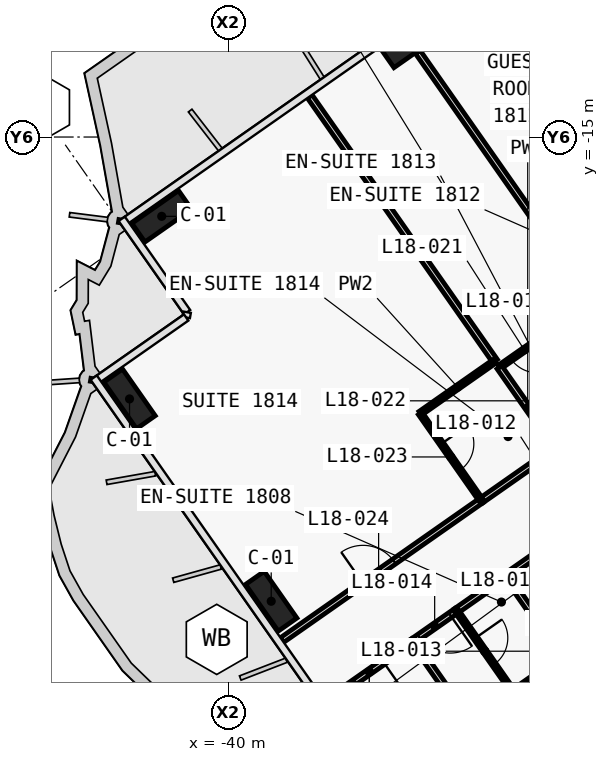
"""IFC4 building model, lengths in metres.
Left out: names, types, materials, properties, quantities, classifications, styles, units other than length and angle.
Written with IfcOpenShell. Run it as: python <this file> out.ifc"""

import sys

from ifc_helpers import new_model, si_unit, direction, frame, frame_2d, origin, origin_2d, place, context, subcontext, project, spatial, rectangle, extrude, element, fill, save


model = new_model("IFC4")
c1 = context("Model", 3, precision=1e-05, world=origin(), true_north=direction((0.0, 1.0)))
c2 = subcontext(c1, "Body", "Model", "MODEL_VIEW")
j1 = project(units=[si_unit("LENGTHUNIT", "METRE"), si_unit("PLANEANGLEUNIT", "RADIAN")], contexts=[c1])
p1 = place(None, origin())
s1 = spatial("IfcSite", under=j1, at=p1, CompositionType="ELEMENT")
p2 = place(p1, origin())
s2 = spatial("IfcBuilding", under=s1, at=p2, CompositionType="ELEMENT")
p3 = place(p2, frame((0.0, 0.0, 90.5)))
s3 = spatial("IfcBuildingStorey", under=s2, at=p3, CompositionType="ELEMENT", Elevation=90.5)
for number, where, z_axis, x_axis in (
    (1, (-35.197, -12.498, 0.0), (0.0, 0.0, 1.0), (-0.819, -0.574, 0.0)),
    (2, (-41.75, -17.087, 0.0), (0.0, 0.0, 1.0), (-0.819, -0.574, 0.0)),
    (3, (-38.869, -27.216, 0.0), (0.0, 0.0, 1.0), (-0.574, 0.819, 0.0)),
    (4, (-42.597, -21.892, 0.0), (0.0, 0.0, 1.0), (-0.574, 0.819, 0.0)),
):
    element("IfcColumn", number, at=place(p3, frame(where, z_axis=z_axis, x_axis=x_axis)), inside=s3, PredefinedType="COLUMN", context=c2, shape_type="SweptSolid", body=[
        extrude(rectangle(XDim=1.5, YDim=0.6, at=origin_2d()), origin(), (0.0, 0.0, 1.0), 3.6),
    ])
p4 = place(p3, frame((-38.582, -28.236, 0.0), z_axis=(0.0, 0.0, 1.0), x_axis=(0.819158447199, 0.573567291939, 0.0)))
e5 = element("IfcWall", 5, at=p4, inside=s3, PredefinedType="PARTITIONING", context=c2, shape_type="SweptSolid", body=[
    extrude(rectangle(XDim=6.401, YDim=0.15, at=frame_2d((3.2, 0.0))), origin(), (0.0, 0.0, 1.0), 2.5),
])
p5 = place(p4, frame((2.6, 0.0, 0.0)))
e6 = element("IfcOpeningElement", 6, at=p5, cuts=e5, PredefinedType="OPENING", context=c2, shape_type="SweptSolid", body=[
    extrude(rectangle(XDim=1.0, YDim=2.1, at=frame_2d((0.5, 1.05))), frame((0.0, 0.085, 0.0), z_axis=(0.0, -1.0, 0.0), x_axis=(1.0, 0.0, 0.0)), (0.0, 0.0, 1.0), 0.17),
])
p6 = place(p3, frame((-33.341, -24.566, 0.0), z_axis=(0.0, 0.0, 1.0), x_axis=(0.819179439794, 0.573537309527, 0.0)))
e7 = element("IfcWall", 7, at=p6, inside=s3, PredefinedType="PARTITIONING", context=c2, shape_type="SweptSolid", body=[
    extrude(rectangle(XDim=2.404, YDim=0.15, at=frame_2d((1.202, 0.0))), origin(), (0.0, 0.0, 1.0), 3.32),
])
p7 = place(p3, frame((-31.371, -25.629, 0.0), z_axis=(0.0, 0.0, 1.0), x_axis=(-0.819189013667, -0.573523634986, 0.0)))
e8 = element("IfcWall", 8, at=p7, inside=s3, PredefinedType="PARTITIONING", context=c2, shape_type="SweptSolid", body=[
    extrude(rectangle(XDim=1.604, YDim=0.15, at=frame_2d((0.802, 0.0))), origin(), (0.0, 0.0, 1.0), 3.32),
])
p8 = place(p3, frame((-33.993, -27.465, 0.0), z_axis=(0.0, 0.0, 1.0), x_axis=(-0.819199220913, -0.573509055252, 0.0)))
e9 = element("IfcWall", 9, at=p8, inside=s3, PredefinedType="PARTITIONING", context=c2, shape_type="SweptSolid", body=[
    extrude(rectangle(XDim=1.403, YDim=0.15, at=frame_2d((0.702, 0.0))), origin(), (0.0, 0.0, 1.0), 3.32),
])
p9 = place(p8, frame((0.201, 0.0, 0.0)))
e10 = element("IfcOpeningElement", 10, at=p9, cuts=e9, PredefinedType="OPENING", context=c2, shape_type="SweptSolid", body=[
    extrude(rectangle(XDim=1.0, YDim=2.1, at=frame_2d((0.5, 1.05))), frame((0.0, 0.085, 0.0), z_axis=(0.0, -1.0, 0.0), x_axis=(1.0, 0.0, 0.0)), (0.0, 0.0, 1.0), 0.17),
])
p10 = place(p3, frame((-32.682, -26.546, 0.0), z_axis=(0.0, 0.0, 1.0), x_axis=(-0.819117502046, -0.573625764625, 0.0)))
e11 = element("IfcWall", 11, at=p10, inside=s3, PredefinedType="PARTITIONING", context=c2, shape_type="SweptSolid", body=[
    extrude(rectangle(XDim=1.604, YDim=0.15, at=frame_2d((0.802, 0.0))), origin(), (0.0, 0.0, 1.0), 3.32),
])
p11 = place(p3, frame((-35.139, -28.267, 0.0), z_axis=(0.0, 0.0, 1.0), x_axis=(-0.819125488359, -0.573614360281, 0.0)))
e12 = element("IfcWall", 12, at=p11, inside=s3, PredefinedType="PARTITIONING", context=c2, shape_type="SweptSolid", body=[
    extrude(rectangle(XDim=2.802, YDim=0.15, at=frame_2d((1.401, 0.0))), origin(), (0.0, 0.0, 1.0), 2.5),
])
p12 = place(p11, frame((0.951, 0.0, 0.0)))
e13 = element("IfcOpeningElement", 13, at=p12, cuts=e12, PredefinedType="OPENING", context=c2, shape_type="SweptSolid", body=[
    extrude(rectangle(XDim=0.9, YDim=2.1, at=frame_2d((0.45, 1.05))), frame((0.0, 0.085, 0.0), z_axis=(0.0, -1.0, 0.0), x_axis=(1.0, 0.0, 0.0)), (0.0, 0.0, 1.0), 0.17),
])
p13 = place(p3, frame((-27.949, -17.618, 0.0), z_axis=(0.0, 0.0, 1.0), x_axis=(-0.573579093502, 0.819150183725, 0.0)))
e14 = element("IfcWall", 14, at=p13, inside=s3, PredefinedType="PARTITIONING", context=c2, shape_type="SweptSolid", body=[
    extrude(rectangle(XDim=8.701, YDim=0.15, at=frame_2d((4.351, 0.0))), origin(), (0.0, 0.0, 1.0), 2.6),
])
p14 = place(p3, frame((-29.845, -20.141, 0.0), z_axis=(0.0, 0.0, 1.0), x_axis=(-0.573558725113, 0.819164445546, 0.0)))
e15 = element("IfcWall", 15, at=p14, inside=s3, PredefinedType="PARTITIONING", context=c2, shape_type="SweptSolid", body=[
    extrude(rectangle(XDim=9.01, YDim=0.15, at=frame_2d((4.505, 0.0))), origin(), (0.0, 0.0, 1.0), 2.6),
])
p15 = place(p3, frame((-31.555, -20.14, 0.0), z_axis=(0.0, 0.0, 1.0), x_axis=(-0.819131543282, -0.57360571371, 0.0)))
e16 = element("IfcWall", 16, at=p15, inside=s3, PredefinedType="PARTITIONING", context=c2, shape_type="SweptSolid", body=[
    extrude(rectangle(XDim=1.6, YDim=0.12, at=frame_2d((0.8, 0.0))), origin(), (0.0, 0.0, 1.0), 3.32),
])
p16 = place(p15, frame((0.375, 0.0, 0.0)))
e17 = element("IfcOpeningElement", 17, at=p16, cuts=e16, PredefinedType="OPENING", context=c2, shape_type="SweptSolid", body=[
    extrude(rectangle(XDim=0.85, YDim=2.05, at=frame_2d((0.425, 1.025))), frame((0.0, 0.07, 0.0), z_axis=(0.0, -1.0, 0.0), x_axis=(1.0, 0.0, 0.0)), (0.0, 0.0, 1.0), 0.14),
])
p17 = place(p3, frame((-32.979, -20.896, 0.0), z_axis=(0.0, 0.0, 1.0), x_axis=(-0.573576058406, 0.819152308929, 0.0)))
e18 = element("IfcWall", 18, at=p17, inside=s3, PredefinedType="PARTITIONING", context=c2, shape_type="SweptSolid", body=[
    extrude(rectangle(XDim=8.501, YDim=0.15, at=frame_2d((4.25, 0.0))), origin(), (0.0, 0.0, 1.0), 2.5),
])
p18 = place(p3, frame((-31.373, -23.189, 0.0), z_axis=(0.0, 0.0, 1.0), x_axis=(-0.573600972199, 0.819134863556, 0.0)))
e19 = element("IfcWall", 19, at=p18, inside=s3, PredefinedType="PARTITIONING", context=c2, shape_type="SweptSolid", body=[
    extrude(rectangle(XDim=2.6, YDim=0.15, at=frame_2d((1.3, 0.0))), origin(), (0.0, 0.0, 1.0), 2.6),
])
p19 = place(p3, frame((-32.98, -20.894, 0.0), z_axis=(0.0, 0.0, 1.0), x_axis=(-0.819155442668, -0.573571582932, 0.0)))
e20 = element("IfcWall", 20, at=p19, inside=s3, PredefinedType="PARTITIONING", context=c2, shape_type="SweptSolid", body=[
    extrude(rectangle(XDim=2.4, YDim=0.12, at=frame_2d((1.2, 0.0))), origin(), (0.0, 0.0, 1.0), 3.32),
])
p20 = place(p3, frame((-34.946, -22.272, 0.0), z_axis=(0.0, 0.0, 1.0), x_axis=(0.573608623498, -0.819129505664, 0.0)))
e21 = element("IfcWall", 21, at=p20, inside=s3, PredefinedType="PARTITIONING", context=c2, shape_type="SweptSolid", body=[
    extrude(rectangle(XDim=2.8, YDim=0.12, at=frame_2d((1.4, 0.0))), origin(), (0.0, 0.0, 1.0), 2.6),
])
p21 = place(p20, frame((0.975, 0.0, 0.0)))
e22 = element("IfcOpeningElement", 22, at=p21, cuts=e21, PredefinedType="OPENING", context=c2, shape_type="SweptSolid", body=[
    extrude(rectangle(XDim=0.85, YDim=2.05, at=frame_2d((0.425, 1.025))), frame((0.0, 0.07, 0.0), z_axis=(0.0, -1.0, 0.0), x_axis=(1.0, 0.0, 0.0)), (0.0, 0.0, 1.0), 0.14),
])
p22 = place(p3, frame((-31.192, -28.677, 0.0), z_axis=(0.0, 0.0, 1.0), x_axis=(-0.573537965655, 0.819178980414, 0.0)))
e23 = element("IfcWall", 23, at=p22, inside=s3, PredefinedType="PARTITIONING", context=c2, shape_type="SweptSolid", body=[
    extrude(rectangle(XDim=2.6, YDim=0.15, at=frame_2d((1.3, 0.0))), origin(), (0.0, 0.0, 1.0), 3.32),
])
p23 = place(p3, frame((-33.995, -27.466, 0.0), z_axis=(0.0, 0.0, 1.0), x_axis=(0.573582085028, -0.819148089014, 0.0)))
e24 = element("IfcWall", 24, at=p23, inside=s3, PredefinedType="PARTITIONING", context=c2, shape_type="SweptSolid", body=[
    extrude(rectangle(XDim=2.6, YDim=0.12, at=frame_2d((1.3, 0.0))), origin(), (0.0, 0.0, 1.0), 3.32),
])
p24 = place(p23, frame((0.875, 0.0, 0.0)))
e25 = element("IfcOpeningElement", 25, at=p24, cuts=e24, PredefinedType="OPENING", context=c2, shape_type="SweptSolid", body=[
    extrude(rectangle(XDim=0.85, YDim=2.05, at=frame_2d((0.425, 1.025))), frame((0.0, 0.07, 0.0), z_axis=(0.0, -1.0, 0.0), x_axis=(1.0, 0.0, 0.0)), (0.0, 0.0, 1.0), 0.14),
])
p25 = place(p3, frame((-32.502, -29.596, 0.0), z_axis=(0.0, 0.0, 1.0), x_axis=(0.819131543282, 0.57360571371, 0.0)))
e26 = element("IfcWall", 26, at=p25, inside=s3, PredefinedType="PARTITIONING", context=c2, shape_type="SweptSolid", body=[
    extrude(rectangle(XDim=1.6, YDim=0.12, at=frame_2d((0.8, 0.0))), origin(), (0.0, 0.0, 1.0), 3.32),
])
p26 = place(p3, frame((-32.675, -31.791, 0.0), z_axis=(0.0, 0.0, 1.0), x_axis=(-0.573553792486, 0.819167899227, 0.0)))
e27 = element("IfcWall", 27, at=p26, inside=s3, PredefinedType="PARTITIONING", context=c2, shape_type="SweptSolid", body=[
    extrude(rectangle(XDim=4.3, YDim=0.15, at=frame_2d((2.15, 0.0))), origin(), (0.0, 0.0, 1.0), 3.32),
])
p27 = place(p24, origin())
e28 = element("IfcDoor", 28, at=p27, inside=s3, OperationType="SINGLE_SWING_RIGHT", PredefinedType="DOOR", context=c2, shape_type="SweptSolid", body=[
    extrude(rectangle(XDim=0.85, YDim=2.05, at=frame_2d((0.425, 1.025))), frame((0.0, 0.025, 0.0), z_axis=(0.0, -1.0, 0.0), x_axis=(1.0, 0.0, 0.0)), (0.0, 0.0, 1.0), 0.05),
])
fill(e25, e28)
p28 = place(p9, origin())
e29 = element("IfcDoor", 29, at=p28, inside=s3, OperationType="SINGLE_SWING_LEFT", PredefinedType="DOOR", context=c2, shape_type="SweptSolid", body=[
    extrude(rectangle(XDim=1.0, YDim=2.1, at=frame_2d((0.5, 1.05))), frame((0.0, 0.025, 0.0), z_axis=(0.0, -1.0, 0.0), x_axis=(1.0, 0.0, 0.0)), (0.0, 0.0, 1.0), 0.05),
])
fill(e10, e29)
p29 = place(p12, origin())
e30 = element("IfcDoor", 30, at=p29, inside=s3, OperationType="SINGLE_SWING_LEFT", PredefinedType="DOOR", context=c2, shape_type="SweptSolid", body=[
    extrude(rectangle(XDim=0.9, YDim=2.1, at=frame_2d((0.45, 1.05))), frame((0.0, 0.025, 0.0), z_axis=(0.0, -1.0, 0.0), x_axis=(1.0, 0.0, 0.0)), (0.0, 0.0, 1.0), 0.05),
])
fill(e13, e30)
p30 = place(p16, origin())
e31 = element("IfcDoor", 31, at=p30, inside=s3, OperationType="SINGLE_SWING_LEFT", PredefinedType="DOOR", context=c2, shape_type="SweptSolid", body=[
    extrude(rectangle(XDim=0.85, YDim=2.05, at=frame_2d((0.425, 1.025))), frame((0.0, 0.025, 0.0), z_axis=(0.0, -1.0, 0.0), x_axis=(1.0, 0.0, 0.0)), (0.0, 0.0, 1.0), 0.05),
])
fill(e17, e31)
p31 = place(p21, origin())
e32 = element("IfcDoor", 32, at=p31, inside=s3, OperationType="SINGLE_SWING_LEFT", PredefinedType="DOOR", context=c2, shape_type="SweptSolid", body=[
    extrude(rectangle(XDim=0.85, YDim=2.05, at=frame_2d((0.425, 1.025))), frame((0.0, 0.025, 0.0), z_axis=(0.0, -1.0, 0.0), x_axis=(1.0, 0.0, 0.0)), (0.0, 0.0, 1.0), 0.05),
])
fill(e22, e32)
p32 = place(p5, origin())
e33 = element("IfcDoor", 33, at=p32, inside=s3, OperationType="SINGLE_SWING_RIGHT", PredefinedType="DOOR", context=c2, shape_type="SweptSolid", body=[
    extrude(rectangle(XDim=1.0, YDim=2.1, at=frame_2d((0.5, 1.05))), frame((0.0, 0.025, 0.0), z_axis=(0.0, -1.0, 0.0), x_axis=(1.0, 0.0, 0.0)), (0.0, 0.0, 1.0), 0.05),
])
fill(e6, e33)
save(model, sys.argv[1])
